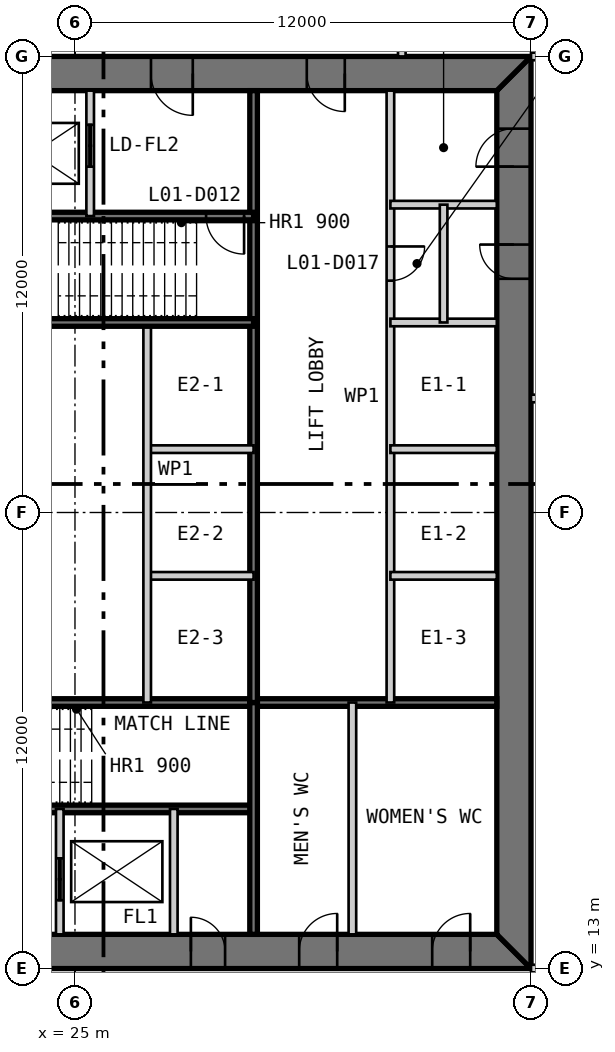
"""IFC4 building model, lengths in metres.
Left out: names, types, materials, properties, quantities, classifications, styles, units other than length and angle.
Written with IfcOpenShell. Run it as: python <this file> out.ifc"""

import sys

from ifc_helpers import new_model, si_unit, direction, frame, frame_2d, origin, place, context, subcontext, project, spatial, polyline, rectangle, outline, extrude, element, fill, save


model = new_model("IFC4")
c1 = context("Model", 3, precision=1e-05, world=origin(), true_north=direction((0.0, 1.0)))
c2 = subcontext(c1, "Body", "Model", "MODEL_VIEW")
j1 = project(units=[si_unit("LENGTHUNIT", "METRE"), si_unit("PLANEANGLEUNIT", "RADIAN")], contexts=[c1])
p1 = place(None, origin())
s1 = spatial("IfcSite", under=j1, at=p1, CompositionType="ELEMENT")
p2 = place(p1, origin())
s2 = spatial("IfcBuilding", under=s1, at=p2, CompositionType="ELEMENT")
p3 = place(p2, frame((0.0, 0.0, 7.0)))
s3 = spatial("IfcBuildingStorey", under=s2, at=p3, CompositionType="ELEMENT", Elevation=7.0)
p4 = place(p3, frame((13.0, 13.45, 0.0), z_axis=(0.0, 0.0, 1.0), x_axis=(1.0, 0.0, 0.0)))
e1 = element("IfcWall", 1, at=p4, inside=s3, PredefinedType="SHEAR", context=c2, shape_type="SweptSolid", body=[
    extrude(outline(polyline([(0.0, -0.45), (24.0, -0.45), (23.1, 0.45), (0.9, 0.45), (0.0, -0.45)])), origin(), (0.0, 0.0, 1.0), 4.8),
])
p5 = place(p4, frame((4.9, 0.0, 0.0)))
e2 = element("IfcOpeningElement", 2, at=p5, cuts=e1, PredefinedType="OPENING", context=c2, shape_type="SweptSolid", body=[
    extrude(rectangle(XDim=1.0, YDim=2.2, at=frame_2d((0.5, 1.1))), frame((0.0, 0.46, 0.0), z_axis=(0.0, -1.0, 0.0), x_axis=(1.0, 0.0, 0.0)), (0.0, 0.0, 1.0), 0.92),
])
p6 = place(p4, frame((8.9, 0.0, 0.0)))
e3 = element("IfcOpeningElement", 3, at=p6, cuts=e1, PredefinedType="OPENING", context=c2, shape_type="SweptSolid", body=[
    extrude(rectangle(XDim=1.1, YDim=2.2, at=frame_2d((0.55, 1.1))), frame((0.0, 0.46, 0.0), z_axis=(0.0, -1.0, 0.0), x_axis=(1.0, 0.0, 0.0)), (0.0, 0.0, 1.0), 0.92),
])
p7 = place(p4, frame((15.05, 0.0, 0.0)))
e4 = element("IfcOpeningElement", 4, at=p7, cuts=e1, PredefinedType="OPENING", context=c2, shape_type="SweptSolid", body=[
    extrude(rectangle(XDim=0.9, YDim=2.2, at=frame_2d((0.45, 1.1))), frame((0.0, 0.46, 0.0), z_axis=(0.0, -1.0, 0.0), x_axis=(1.0, 0.0, 0.0)), (0.0, 0.0, 1.0), 0.92),
])
p8 = place(p4, frame((17.9, 0.0, 0.0)))
e5 = element("IfcOpeningElement", 5, at=p8, cuts=e1, PredefinedType="OPENING", context=c2, shape_type="SweptSolid", body=[
    extrude(rectangle(XDim=1.0, YDim=2.2, at=frame_2d((0.5, 1.1))), frame((0.0, 0.46, 0.0), z_axis=(0.0, -1.0, 0.0), x_axis=(1.0, 0.0, 0.0)), (0.0, 0.0, 1.0), 0.92),
])
p9 = place(p4, frame((21.4, 0.0, 0.0)))
e6 = element("IfcOpeningElement", 6, at=p9, cuts=e1, PredefinedType="OPENING", context=c2, shape_type="SweptSolid", body=[
    extrude(rectangle(XDim=1.0, YDim=2.2, at=frame_2d((0.5, 1.1))), frame((0.0, 0.46, 0.0), z_axis=(0.0, -1.0, 0.0), x_axis=(1.0, 0.0, 0.0)), (0.0, 0.0, 1.0), 0.92),
])
p10 = place(p3, frame((36.55, 13.9, 0.0), z_axis=(0.0, 0.0, 1.0), x_axis=(0.0, 1.0, 0.0)))
e7 = element("IfcWall", 7, at=p10, inside=s3, PredefinedType="SHEAR", context=c2, shape_type="SweptSolid", body=[
    extrude(outline(polyline([(-0.9, -0.45), (23.1, -0.45), (22.2, 0.45), (0.0, 0.45), (-0.9, -0.45)])), origin(), (0.0, 0.0, 1.0), 4.8),
])
p11 = place(p10, frame((20.2, 0.0, 0.0)))
e8 = element("IfcOpeningElement", 8, at=p11, cuts=e7, PredefinedType="OPENING", context=c2, shape_type="SweptSolid", body=[
    extrude(rectangle(XDim=1.0, YDim=2.2, at=frame_2d((0.5, 1.1))), frame((0.0, 0.46, 0.0), z_axis=(0.0, -1.0, 0.0), x_axis=(1.0, 0.0, 0.0)), (0.0, 0.0, 1.0), 0.92),
])
p12 = place(p10, frame((17.25, 0.0, 0.0)))
e9 = element("IfcOpeningElement", 9, at=p12, cuts=e7, PredefinedType="OPENING", context=c2, shape_type="SweptSolid", body=[
    extrude(rectangle(XDim=0.9, YDim=2.2, at=frame_2d((0.45, 1.1))), frame((0.0, 0.46, 0.0), z_axis=(0.0, -1.0, 0.0), x_axis=(1.0, 0.0, 0.0)), (0.0, 0.0, 1.0), 0.92),
])
p13 = place(p3, frame((37.0, 36.55, 0.0), z_axis=(0.0, 0.0, 1.0), x_axis=(-1.0, 0.0, 0.0)))
e10 = element("IfcWall", 10, at=p13, inside=s3, PredefinedType="SHEAR", context=c2, shape_type="SweptSolid", body=[
    extrude(outline(polyline([(0.0, -0.45), (24.0, -0.45), (23.1, 0.45), (0.9, 0.45), (0.0, -0.45)])), origin(), (0.0, 0.0, 1.0), 4.8),
])
p14 = place(p13, frame((4.9, 0.0, 0.0)))
e11 = element("IfcOpeningElement", 11, at=p14, cuts=e10, PredefinedType="OPENING", context=c2, shape_type="SweptSolid", body=[
    extrude(rectangle(XDim=1.0, YDim=2.2, at=frame_2d((0.5, 1.1))), frame((0.0, 0.46, 0.0), z_axis=(0.0, -1.0, 0.0), x_axis=(1.0, 0.0, 0.0)), (0.0, 0.0, 1.0), 0.92),
])
p15 = place(p13, frame((8.9, 0.0, 0.0)))
e12 = element("IfcOpeningElement", 12, at=p15, cuts=e10, PredefinedType="OPENING", context=c2, shape_type="SweptSolid", body=[
    extrude(rectangle(XDim=1.1, YDim=2.2, at=frame_2d((0.55, 1.1))), frame((0.0, 0.46, 0.0), z_axis=(0.0, -1.0, 0.0), x_axis=(1.0, 0.0, 0.0)), (0.0, 0.0, 1.0), 0.92),
])
p16 = place(p13, frame((15.05, 0.0, 0.0)))
e13 = element("IfcOpeningElement", 13, at=p16, cuts=e10, PredefinedType="OPENING", context=c2, shape_type="SweptSolid", body=[
    extrude(rectangle(XDim=0.9, YDim=2.2, at=frame_2d((0.45, 1.1))), frame((0.0, 0.46, 0.0), z_axis=(0.0, -1.0, 0.0), x_axis=(1.0, 0.0, 0.0)), (0.0, 0.0, 1.0), 0.92),
])
p17 = place(p13, frame((17.9, 0.0, 0.0)))
e14 = element("IfcOpeningElement", 14, at=p17, cuts=e10, PredefinedType="OPENING", context=c2, shape_type="SweptSolid", body=[
    extrude(rectangle(XDim=1.0, YDim=2.2, at=frame_2d((0.5, 1.1))), frame((0.0, 0.46, 0.0), z_axis=(0.0, -1.0, 0.0), x_axis=(1.0, 0.0, 0.0)), (0.0, 0.0, 1.0), 0.92),
])
p18 = place(p13, frame((21.4, 0.0, 0.0)))
e15 = element("IfcOpeningElement", 15, at=p18, cuts=e10, PredefinedType="OPENING", context=c2, shape_type="SweptSolid", body=[
    extrude(rectangle(XDim=1.0, YDim=2.2, at=frame_2d((0.5, 1.1))), frame((0.0, 0.46, 0.0), z_axis=(0.0, -1.0, 0.0), x_axis=(1.0, 0.0, 0.0)), (0.0, 0.0, 1.0), 0.92),
])
p19 = place(p3, frame((20.3, 17.2, 0.0), z_axis=(0.0, 0.0, 1.0), x_axis=(1.0, 0.0, 0.0)))
e16 = element("IfcWall", 16, at=p19, inside=s3, PredefinedType="SOLIDWALL", context=c2, shape_type="SweptSolid", body=[
    extrude(rectangle(XDim=9.4, YDim=0.2, at=frame_2d((4.7, 0.0))), origin(), (0.0, 0.0, 1.0), 4.6),
])
p20 = place(p19, frame((0.25, 0.0, 0.0)))
e17 = element("IfcOpeningElement", 17, at=p20, cuts=e16, PredefinedType="OPENING", context=c2, shape_type="SweptSolid", body=[
    extrude(rectangle(XDim=1.0, YDim=2.2, at=frame_2d((0.5, 1.1))), frame((0.0, 0.11, 0.0), z_axis=(0.0, -1.0, 0.0), x_axis=(1.0, 0.0, 0.0)), (0.0, 0.0, 1.0), 0.22),
])
p21 = place(p3, frame((20.3, 20.0, 0.0), z_axis=(0.0, 0.0, 1.0), x_axis=(1.0, 0.0, 0.0)))
e18 = element("IfcWall", 18, at=p21, inside=s3, PredefinedType="SOLIDWALL", context=c2, shape_type="SweptSolid", body=[
    extrude(rectangle(XDim=15.8, YDim=0.2, at=frame_2d((7.9, 0.0))), origin(), (0.0, 0.0, 1.0), 4.6),
])
p22 = place(p3, frame((24.6, 13.9, 0.0), z_axis=(0.0, 0.0, 1.0), x_axis=(0.0, 1.0, 0.0)))
e19 = element("IfcWall", 19, at=p22, inside=s3, PredefinedType="PARTITIONING", context=c2, shape_type="SweptSolid", body=[
    extrude(rectangle(XDim=3.3, YDim=0.2, at=frame_2d((1.65, 0.0))), origin(), (0.0, 0.0, 1.0), 4.6),
])
p23 = place(p22, frame((0.9, 0.0, 0.0)))
e20 = element("IfcOpeningElement", 20, at=p23, cuts=e19, PredefinedType="OPENING", context=c2, shape_type="SweptSolid", body=[
    extrude(rectangle(XDim=1.1, YDim=2.2, at=frame_2d((0.55, 1.1))), frame((0.0, 0.11, 0.0), z_axis=(0.0, -1.0, 0.0), x_axis=(1.0, 0.0, 0.0)), (0.0, 0.0, 1.0), 0.22),
])
p24 = place(p3, frame((27.6, 13.9, 0.0), z_axis=(0.0, 0.0, 1.0), x_axis=(0.0, 1.0, 0.0)))
e21 = element("IfcWall", 21, at=p24, inside=s3, PredefinedType="PARTITIONING", context=c2, shape_type="SweptSolid", body=[
    extrude(rectangle(XDim=3.3, YDim=0.2, at=frame_2d((1.65, 0.0))), origin(), (0.0, 0.0, 1.0), 4.6),
])
p25 = place(p3, frame((29.7, 13.9, 0.0), z_axis=(0.0, 0.0, 1.0), x_axis=(0.0, 1.0, 0.0)))
e22 = element("IfcWall", 22, at=p25, inside=s3, PredefinedType="SOLIDWALL", context=c2, shape_type="SweptSolid", body=[
    extrude(rectangle(XDim=6.1, YDim=0.2, at=frame_2d((3.05, 0.0))), origin(), (0.0, 0.0, 1.0), 4.6),
])
p26 = place(p3, frame((32.3, 13.9, 0.0), z_axis=(0.0, 0.0, 1.0), x_axis=(0.0, 1.0, 0.0)))
e23 = element("IfcWall", 23, at=p26, inside=s3, PredefinedType="PARTITIONING", context=c2, shape_type="SweptSolid", body=[
    extrude(rectangle(XDim=6.1, YDim=0.2, at=frame_2d((3.05, 0.0))), origin(), (0.0, 0.0, 1.0), 4.6),
])
p27 = place(p3, frame((33.3, 36.1, 0.0), z_axis=(0.0, 0.0, 1.0), x_axis=(0.0, -1.0, 0.0)))
e24 = element("IfcWall", 24, at=p27, inside=s3, PredefinedType="PARTITIONING", context=c2, shape_type="SweptSolid", body=[
    extrude(rectangle(XDim=16.1, YDim=0.2, at=frame_2d((8.05, 0.0))), origin(), (0.0, 0.0, 1.0), 4.6),
])
p28 = place(p27, frame((4.1, 0.0, 0.0)))
e25 = element("IfcOpeningElement", 25, at=p28, cuts=e24, PredefinedType="OPENING", context=c2, shape_type="SweptSolid", body=[
    extrude(rectangle(XDim=0.9, YDim=2.2, at=frame_2d((0.45, 1.1))), frame((0.0, 0.11, 0.0), z_axis=(0.0, -1.0, 0.0), x_axis=(1.0, 0.0, 0.0)), (0.0, 0.0, 1.0), 0.22),
])
p29 = place(p3, frame((29.7, 36.1, 0.0), z_axis=(0.0, 0.0, 1.0), x_axis=(0.0, -1.0, 0.0)))
e26 = element("IfcWall", 26, at=p29, inside=s3, PredefinedType="SOLIDWALL", context=c2, shape_type="SweptSolid", body=[
    extrude(rectangle(XDim=16.1, YDim=0.2, at=frame_2d((8.05, 0.0))), origin(), (0.0, 0.0, 1.0), 4.6),
])
for number, where, z_axis, x_axis in (
    (27, (36.1, 30.0, 0.0), (0.0, 0.0, 1.0), (-1.0, 0.0, 0.0)),
    (28, (36.1, 26.667, 0.0), (0.0, 0.0, 1.0), (-1.0, 0.0, 0.0)),
    (29, (36.1, 23.333, 0.0), (0.0, 0.0, 1.0), (-1.0, 0.0, 0.0)),
    (30, (29.7, 26.667, 0.0), (0.0, 0.0, 1.0), (-1.0, 0.0, 0.0)),
    (31, (29.7, 23.333, 0.0), (0.0, 0.0, 1.0), (-1.0, 0.0, 0.0)),
):
    element("IfcWall", number, at=place(p3, frame(where, z_axis=z_axis, x_axis=x_axis)), inside=s3, PredefinedType="PARTITIONING", context=c2, shape_type="SweptSolid", body=[
        extrude(rectangle(XDim=2.8, YDim=0.2, at=frame_2d((1.4, 0.0))), origin(), (0.0, 0.0, 1.0), 4.6),
    ])
p30 = place(p3, frame((26.9, 30.0, 0.0), z_axis=(0.0, 0.0, 1.0), x_axis=(0.0, -1.0, 0.0)))
e32 = element("IfcWall", 32, at=p30, inside=s3, PredefinedType="PARTITIONING", context=c2, shape_type="SweptSolid", body=[
    extrude(rectangle(XDim=10.0, YDim=0.2, at=frame_2d((5.0, 0.0))), origin(), (0.0, 0.0, 1.0), 4.6),
])
p31 = place(p3, frame((29.7, 32.8, 0.0), z_axis=(0.0, 0.0, 1.0), x_axis=(-1.0, 0.0, 0.0)))
e33 = element("IfcWall", 33, at=p31, inside=s3, PredefinedType="SOLIDWALL", context=c2, shape_type="SweptSolid", body=[
    extrude(rectangle(XDim=9.4, YDim=0.2, at=frame_2d((4.7, 0.0))), origin(), (0.0, 0.0, 1.0), 4.6),
])
p32 = place(p31, frame((0.25, 0.0, 0.0)))
e34 = element("IfcOpeningElement", 34, at=p32, cuts=e33, PredefinedType="OPENING", context=c2, shape_type="SweptSolid", body=[
    extrude(rectangle(XDim=1.0, YDim=2.2, at=frame_2d((0.5, 1.1))), frame((0.0, 0.11, 0.0), z_axis=(0.0, -1.0, 0.0), x_axis=(1.0, 0.0, 0.0)), (0.0, 0.0, 1.0), 0.22),
])
p33 = place(p3, frame((29.7, 30.0, 0.0), z_axis=(0.0, 0.0, 1.0), x_axis=(-1.0, 0.0, 0.0)))
e35 = element("IfcWall", 35, at=p33, inside=s3, PredefinedType="SOLIDWALL", context=c2, shape_type="SweptSolid", body=[
    extrude(rectangle(XDim=15.8, YDim=0.2, at=frame_2d((7.9, 0.0))), origin(), (0.0, 0.0, 1.0), 4.6),
])
p34 = place(p3, frame((25.4, 36.1, 0.0), z_axis=(0.0, 0.0, 1.0), x_axis=(0.0, -1.0, 0.0)))
e36 = element("IfcWall", 36, at=p34, inside=s3, PredefinedType="PARTITIONING", context=c2, shape_type="SweptSolid", body=[
    extrude(rectangle(XDim=3.3, YDim=0.2, at=frame_2d((1.65, 0.0))), origin(), (0.0, 0.0, 1.0), 4.6),
])
p35 = place(p34, frame((0.9, 0.0, 0.0)))
e37 = element("IfcOpeningElement", 37, at=p35, cuts=e36, PredefinedType="OPENING", context=c2, shape_type="SweptSolid", body=[
    extrude(rectangle(XDim=1.1, YDim=2.2, at=frame_2d((0.55, 1.1))), frame((0.0, 0.11, 0.0), z_axis=(0.0, -1.0, 0.0), x_axis=(1.0, 0.0, 0.0)), (0.0, 0.0, 1.0), 0.22),
])
p36 = place(p3, frame((36.1, 33.1, 0.0), z_axis=(0.0, 0.0, 1.0), x_axis=(-1.0, 0.0, 0.0)))
e38 = element("IfcWall", 38, at=p36, inside=s3, PredefinedType="PARTITIONING", context=c2, shape_type="SweptSolid", body=[
    extrude(rectangle(XDim=2.8, YDim=0.2, at=frame_2d((1.4, 0.0))), origin(), (0.0, 0.0, 1.0), 4.6),
])
p37 = place(p3, frame((34.7, 33.1, 0.0), z_axis=(0.0, 0.0, 1.0), x_axis=(0.0, -1.0, 0.0)))
e39 = element("IfcWall", 39, at=p37, inside=s3, PredefinedType="PARTITIONING", context=c2, shape_type="SweptSolid", body=[
    extrude(rectangle(XDim=3.1, YDim=0.2, at=frame_2d((1.55, 0.0))), origin(), (0.0, 0.0, 1.0), 4.6),
])
p38 = place(p3, frame((33.6, 37.0, 0.0), z_axis=(0.0, 0.0, 1.0), x_axis=(0.0, 1.0, 0.0)))
e40 = element("IfcWall", 40, at=p38, inside=s3, PredefinedType="PARTITIONING", context=c2, shape_type="SweptSolid", body=[
    extrude(rectangle(XDim=6.0, YDim=0.2, at=frame_2d((3.0, 0.0))), origin(), (0.0, 0.0, 1.0), 4.5),
])
p39 = place(p38, frame((2.55, 0.0, 0.0)))
e41 = element("IfcOpeningElement", 41, at=p39, cuts=e40, PredefinedType="OPENING", context=c2, shape_type="SweptSolid", body=[
    extrude(rectangle(XDim=0.9, YDim=2.2, at=frame_2d((0.45, 1.1))), frame((0.0, 0.11, 0.0), z_axis=(0.0, -1.0, 0.0), x_axis=(1.0, 0.0, 0.0)), (0.0, 0.0, 1.0), 0.22),
])
p40 = place(p3, frame((37.0, 13.0, 0.0), z_axis=(0.0, 0.0, 1.0), x_axis=(1.0, 0.0, 0.0)))
e42 = element("IfcWall", 42, at=p40, inside=s3, PredefinedType="PARTITIONING", context=c2, shape_type="SweptSolid", body=[
    extrude(rectangle(XDim=6.0, YDim=0.2, at=frame_2d((3.0, 0.0))), origin(), (0.0, 0.0, 1.0), 3.653),
])
p41 = place(p3, frame((37.0, 28.0, 0.0), z_axis=(0.0, 0.0, 1.0), x_axis=(1.0, 0.0, 0.0)))
e43 = element("IfcWall", 43, at=p41, inside=s3, PredefinedType="PARTITIONING", context=c2, shape_type="SweptSolid", body=[
    extrude(rectangle(XDim=6.0, YDim=0.2, at=frame_2d((3.0, 0.0))), origin(), (0.0, 0.0, 1.0), 4.5),
])
p42 = place(p41, frame((2.1, 0.0, 0.0)))
e44 = element("IfcOpeningElement", 44, at=p42, cuts=e43, PredefinedType="OPENING", context=c2, shape_type="SweptSolid", body=[
    extrude(rectangle(XDim=1.8, YDim=2.4, at=frame_2d((0.9, 1.2))), frame((0.0, 0.11, 0.0), z_axis=(0.0, -1.0, 0.0), x_axis=(1.0, 0.0, 0.0)), (0.0, 0.0, 1.0), 0.22),
])
p43 = place(p3, frame((37.0, 37.0, 0.0), z_axis=(0.0, 0.0, 1.0), x_axis=(1.0, 0.0, 0.0)))
e45 = element("IfcWall", 45, at=p43, inside=s3, PredefinedType="PARTITIONING", context=c2, shape_type="SweptSolid", body=[
    extrude(rectangle(XDim=6.0, YDim=0.2, at=frame_2d((3.0, 0.0))), origin(), (0.0, 0.0, 1.0), 3.653),
])
p44 = place(p7, origin())
e46 = element("IfcDoor", 46, at=p44, inside=s3, OperationType="SINGLE_SWING_LEFT", PredefinedType="DOOR", context=c2, shape_type="SweptSolid", body=[
    extrude(rectangle(XDim=0.9, YDim=2.2, at=frame_2d((0.45, 1.1))), frame((0.0, 0.025, 0.0), z_axis=(0.0, -1.0, 0.0), x_axis=(1.0, 0.0, 0.0)), (0.0, 0.0, 1.0), 0.05),
    extrude(outline(polyline([(0.0, 0.0), (0.04, 0.0), (0.04, 2.16), (0.86, 2.16), (0.86, 0.0), (0.9, 0.0), (0.9, 2.2), (0.0, 2.2), (0.0, 0.0)])), frame((0.0, 0.3, 0.0), z_axis=(0.0, -1.0, 0.0), x_axis=(1.0, 0.0, 0.0)), (0.0, 0.0, 1.0), 0.6),
])
fill(e4, e46)
p45 = place(p8, origin())
e47 = element("IfcDoor", 47, at=p45, inside=s3, OperationType="SINGLE_SWING_RIGHT", PredefinedType="DOOR", context=c2, shape_type="SweptSolid", body=[
    extrude(rectangle(XDim=1.0, YDim=2.2, at=frame_2d((0.5, 1.1))), frame((0.0, 0.025, 0.0), z_axis=(0.0, -1.0, 0.0), x_axis=(1.0, 0.0, 0.0)), (0.0, 0.0, 1.0), 0.05),
    extrude(outline(polyline([(0.0, 0.0), (0.04, 0.0), (0.04, 2.16), (0.96, 2.16), (0.96, 0.0), (1.0, 0.0), (1.0, 2.2), (0.0, 2.2), (0.0, 0.0)])), frame((0.0, 0.3, 0.0), z_axis=(0.0, -1.0, 0.0), x_axis=(1.0, 0.0, 0.0)), (0.0, 0.0, 1.0), 0.6),
])
fill(e5, e47)
p46 = place(p9, origin())
e48 = element("IfcDoor", 48, at=p46, inside=s3, OperationType="SINGLE_SWING_RIGHT", PredefinedType="DOOR", context=c2, shape_type="SweptSolid", body=[
    extrude(rectangle(XDim=1.0, YDim=2.2, at=frame_2d((0.5, 1.1))), frame((0.0, 0.025, 0.0), z_axis=(0.0, -1.0, 0.0), x_axis=(1.0, 0.0, 0.0)), (0.0, 0.0, 1.0), 0.05),
    extrude(outline(polyline([(0.0, 0.0), (0.04, 0.0), (0.04, 2.16), (0.96, 2.16), (0.96, 0.0), (1.0, 0.0), (1.0, 2.2), (0.0, 2.2), (0.0, 0.0)])), frame((0.0, 0.3, 0.0), z_axis=(0.0, -1.0, 0.0), x_axis=(1.0, 0.0, 0.0)), (0.0, 0.0, 1.0), 0.6),
])
fill(e6, e48)
p47 = place(p14, origin())
e49 = element("IfcDoor", 49, at=p47, inside=s3, OperationType="SINGLE_SWING_LEFT", PredefinedType="DOOR", context=c2, shape_type="SweptSolid", body=[
    extrude(rectangle(XDim=1.0, YDim=2.2, at=frame_2d((0.5, 1.1))), frame((0.0, 0.025, 0.0), z_axis=(0.0, -1.0, 0.0), x_axis=(1.0, 0.0, 0.0)), (0.0, 0.0, 1.0), 0.05),
    extrude(outline(polyline([(0.0, 0.0), (0.04, 0.0), (0.04, 2.16), (0.96, 2.16), (0.96, 0.0), (1.0, 0.0), (1.0, 2.2), (0.0, 2.2), (0.0, 0.0)])), frame((0.0, 0.3, 0.0), z_axis=(0.0, -1.0, 0.0), x_axis=(1.0, 0.0, 0.0)), (0.0, 0.0, 1.0), 0.6),
])
fill(e11, e49)
p48 = place(p15, origin())
e50 = element("IfcDoor", 50, at=p48, inside=s3, OperationType="SINGLE_SWING_LEFT", PredefinedType="DOOR", context=c2, shape_type="SweptSolid", body=[
    extrude(rectangle(XDim=1.1, YDim=2.2, at=frame_2d((0.55, 1.1))), frame((0.0, 0.025, 0.0), z_axis=(0.0, -1.0, 0.0), x_axis=(1.0, 0.0, 0.0)), (0.0, 0.0, 1.0), 0.05),
    extrude(outline(polyline([(0.0, 0.0), (0.04, 0.0), (0.04, 2.16), (1.06, 2.16), (1.06, 0.0), (1.1, 0.0), (1.1, 2.2), (0.0, 2.2), (0.0, 0.0)])), frame((0.0, 0.3, 0.0), z_axis=(0.0, -1.0, 0.0), x_axis=(1.0, 0.0, 0.0)), (0.0, 0.0, 1.0), 0.6),
])
fill(e12, e50)
p49 = place(p32, origin())
e51 = element("IfcDoor", 51, at=p49, inside=s3, OperationType="SINGLE_SWING_LEFT", PredefinedType="DOOR", context=c2, shape_type="SweptSolid", body=[
    extrude(rectangle(XDim=1.0, YDim=2.2, at=frame_2d((0.5, 1.1))), frame((0.0, 0.025, 0.0), z_axis=(0.0, -1.0, 0.0), x_axis=(1.0, 0.0, 0.0)), (0.0, 0.0, 1.0), 0.05),
])
fill(e34, e51)
p50 = place(p11, origin())
e52 = element("IfcDoor", 52, at=p50, inside=s3, OperationType="SINGLE_SWING_LEFT", PredefinedType="DOOR", context=c2, shape_type="SweptSolid", body=[
    extrude(rectangle(XDim=1.0, YDim=2.2, at=frame_2d((0.5, 1.1))), frame((0.0, 0.025, 0.0), z_axis=(0.0, -1.0, 0.0), x_axis=(1.0, 0.0, 0.0)), (0.0, 0.0, 1.0), 0.05),
    extrude(outline(polyline([(0.0, 0.0), (0.04, 0.0), (0.04, 2.16), (0.96, 2.16), (0.96, 0.0), (1.0, 0.0), (1.0, 2.2), (0.0, 2.2), (0.0, 0.0)])), frame((0.0, 0.3, 0.0), z_axis=(0.0, -1.0, 0.0), x_axis=(1.0, 0.0, 0.0)), (0.0, 0.0, 1.0), 0.6),
])
fill(e8, e52)
p51 = place(p28, origin())
e53 = element("IfcDoor", 53, at=p51, inside=s3, OperationType="SINGLE_SWING_LEFT", PredefinedType="DOOR", context=c2, shape_type="SweptSolid", body=[
    extrude(rectangle(XDim=0.9, YDim=2.2, at=frame_2d((0.45, 1.1))), frame((0.0, 0.025, 0.0), z_axis=(0.0, -1.0, 0.0), x_axis=(1.0, 0.0, 0.0)), (0.0, 0.0, 1.0), 0.05),
])
fill(e25, e53)
p52 = place(p12, origin())
e54 = element("IfcDoor", 54, at=p52, inside=s3, OperationType="SINGLE_SWING_RIGHT", PredefinedType="DOOR", context=c2, shape_type="SweptSolid", body=[
    extrude(rectangle(XDim=0.9, YDim=2.2, at=frame_2d((0.45, 1.1))), frame((0.0, 0.025, 0.0), z_axis=(0.0, -1.0, 0.0), x_axis=(1.0, 0.0, 0.0)), (0.0, 0.0, 1.0), 0.05),
    extrude(outline(polyline([(0.0, 0.0), (0.04, 0.0), (0.04, 2.16), (0.86, 2.16), (0.86, 0.0), (0.9, 0.0), (0.9, 2.2), (0.0, 2.2), (0.0, 0.0)])), frame((0.0, 0.3, 0.0), z_axis=(0.0, -1.0, 0.0), x_axis=(1.0, 0.0, 0.0)), (0.0, 0.0, 1.0), 0.6),
])
fill(e9, e54)
p53 = place(p23, origin())
e55 = element("IfcDoor", 55, at=p53, inside=s3, OperationType="DOUBLE_DOOR_SLIDING", PredefinedType="DOOR", context=c2, shape_type="SweptSolid", body=[
    extrude(rectangle(XDim=1.1, YDim=2.2, at=frame_2d((0.55, 1.1))), frame((0.0, 0.025, 0.0), z_axis=(0.0, -1.0, 0.0), x_axis=(1.0, 0.0, 0.0)), (0.0, 0.0, 1.0), 0.05),
])
fill(e20, e55)
p54 = place(p35, origin())
e56 = element("IfcDoor", 56, at=p54, inside=s3, OperationType="DOUBLE_DOOR_SLIDING", PredefinedType="DOOR", context=c2, shape_type="SweptSolid", body=[
    extrude(rectangle(XDim=1.1, YDim=2.2, at=frame_2d((0.55, 1.1))), frame((0.0, 0.025, 0.0), z_axis=(0.0, -1.0, 0.0), x_axis=(1.0, 0.0, 0.0)), (0.0, 0.0, 1.0), 0.05),
])
fill(e37, e56)
save(model, sys.argv[1])
